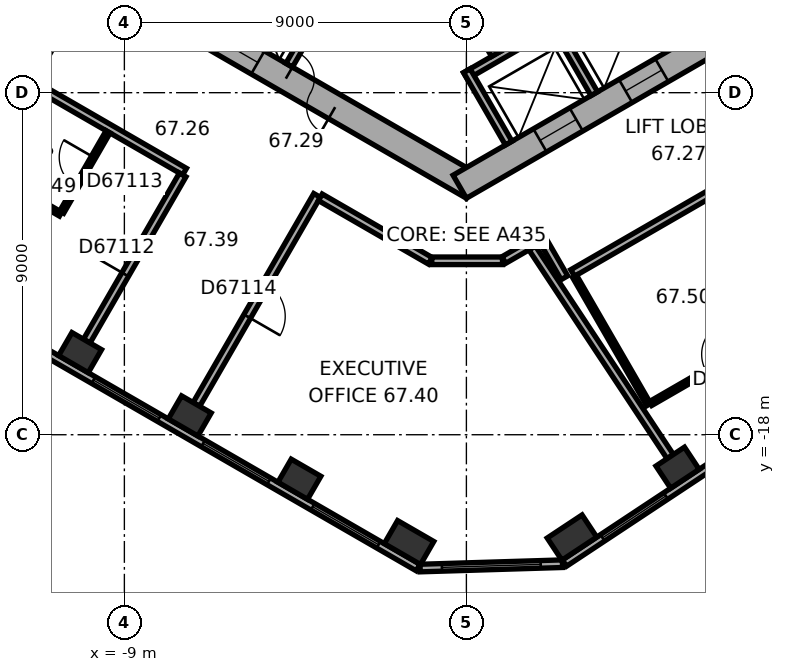
"""IFC4 building model, lengths in metres.
Left out: names, types, materials, properties, quantities, classifications, styles, units other than length and angle.
Written with IfcOpenShell. Run it as: python <this file> out.ifc"""

import sys

from ifc_helpers import new_model, si_unit, direction, frame, frame_2d, origin, origin_2d, place, context, subcontext, project, spatial, rectangle, extrude, element, fill, save


model = new_model("IFC4")
c1 = context("Model", 3, precision=1e-05, world=origin(), true_north=direction((0.0, 1.0)))
c2 = subcontext(c1, "Body", "Model", "MODEL_VIEW")
j1 = project(units=[si_unit("LENGTHUNIT", "METRE"), si_unit("PLANEANGLEUNIT", "RADIAN")], contexts=[c1])
p1 = place(None, origin())
s1 = spatial("IfcSite", under=j1, at=p1, CompositionType="ELEMENT")
p2 = place(p1, origin())
s2 = spatial("IfcBuilding", under=s1, at=p2, CompositionType="ELEMENT")
p3 = place(p2, frame((0.0, 0.0, 270.9)))
s3 = spatial("IfcBuildingStorey", under=s2, at=p3, CompositionType="ELEMENT", Elevation=270.9)
for number, where, z_axis, x_axis in (
    (1, (-10.165, -15.84, 0.0), (0.0, 0.0, 1.0), (0.866, -0.5, 0.0)),
    (2, (-7.28, -17.505, 0.0), (0.0, 0.0, 1.0), (0.866, -0.5, 0.0)),
    (3, (-4.395, -19.171, 0.0), (0.0, 0.0, 1.0), (0.866, -0.5, 0.0)),
):
    element("IfcColumn", number, at=place(p3, frame(where, z_axis=z_axis, x_axis=x_axis)), inside=s3, PredefinedType="COLUMN", context=c2, shape_type="SweptSolid", body=[
        extrude(rectangle(XDim=0.9, YDim=0.7, at=origin_2d()), origin(), (0.0, 0.0, 1.0), 3.7),
    ])
for number, where, z_axis, x_axis in (
    (4, (-1.509, -20.837, 0.0), (0.0, 0.0, 1.0), (0.866, -0.5, 0.0)),
    (5, (2.778, -20.706, 0.0), (0.0, 0.0, 1.0), (0.834, 0.552, 0.0)),
):
    element("IfcColumn", number, at=place(p3, frame(where, z_axis=z_axis, x_axis=x_axis)), inside=s3, PredefinedType="COLUMN", context=c2, shape_type="SweptSolid", body=[
        extrude(rectangle(XDim=1.1, YDim=0.7, at=origin_2d()), origin(), (0.0, 0.0, 1.0), 3.7),
    ])
p4 = place(p3, frame((5.557, -18.867, 0.0), z_axis=(0.0, 0.0, 1.0), x_axis=(0.833885822067, 0.551936985312, 0.0)))
e6 = element("IfcColumn", 6, at=p4, inside=s3, PredefinedType="COLUMN", context=c2, shape_type="SweptSolid", body=[
    extrude(rectangle(XDim=0.9, YDim=0.7, at=origin_2d()), origin(), (0.0, 0.0, 1.0), 3.7),
])
p5 = place(p3, frame((-10.025, -5.586, 0.0), z_axis=(0.0, 0.0, 1.0), x_axis=(0.866026453023, -0.499998182661, 0.0)))
e7 = element("IfcWall", 7, at=p5, inside=s3, PredefinedType="SHEAR", context=c2, shape_type="SweptSolid", body=[
    extrude(rectangle(XDim=11.778, YDim=0.7, at=frame_2d((5.889, 0.0))), origin(), (0.0, 0.0, 1.0), 3.7),
])
p6 = place(p5, frame((6.089, 0.0, 0.0)))
e8 = element("IfcOpeningElement", 8, at=p6, cuts=e7, PredefinedType="OPENING", context=c2, shape_type="SweptSolid", body=[
    extrude(rectangle(XDim=1.5, YDim=2.1, at=frame_2d((0.75, 1.05))), frame((0.0, 0.36, 0.0), z_axis=(0.0, -1.0, 0.0), x_axis=(1.0, 0.0, 0.0)), (0.0, 0.0, 1.0), 0.72),
])
p7 = place(p5, frame((1.539, 0.0, 0.0)))
e9 = element("IfcOpeningElement", 9, at=p7, cuts=e7, PredefinedType="OPENING", context=c2, shape_type="SweptSolid", body=[
    extrude(rectangle(XDim=1.1, YDim=2.1, at=frame_2d((0.55, 1.05))), frame((0.0, 0.36, 0.0), z_axis=(0.0, -1.0, 0.0), x_axis=(1.0, 0.0, 0.0)), (0.0, 0.0, 1.0), 0.72),
])
p8 = place(p5, frame((4.139, 0.0, 0.0)))
e10 = element("IfcOpeningElement", 10, at=p8, cuts=e7, PredefinedType="OPENING", context=c2, shape_type="SweptSolid", body=[
    extrude(rectangle(XDim=1.1, YDim=2.1, at=frame_2d((0.55, 1.05))), frame((0.0, 0.36, 0.0), z_axis=(0.0, -1.0, 0.0), x_axis=(1.0, 0.0, 0.0)), (0.0, 0.0, 1.0), 0.72),
])
p9 = place(p3, frame((-0.175, -11.475, 0.0), z_axis=(0.0, 0.0, 1.0), x_axis=(0.866026453023, 0.499998182661, 0.0)))
e11 = element("IfcWall", 11, at=p9, inside=s3, PredefinedType="SHEAR", context=c2, shape_type="SweptSolid", body=[
    extrude(rectangle(XDim=11.778, YDim=0.7, at=frame_2d((5.889, 0.0))), origin(), (0.0, 0.0, 1.0), 3.7),
])
p10 = place(p9, frame((2.439, 0.0, 0.0)))
e12 = element("IfcOpeningElement", 12, at=p10, cuts=e11, PredefinedType="OPENING", context=c2, shape_type="SweptSolid", body=[
    extrude(rectangle(XDim=1.1, YDim=2.1, at=frame_2d((0.55, 1.05))), frame((0.0, 0.36, 0.0), z_axis=(0.0, -1.0, 0.0), x_axis=(1.0, 0.0, 0.0)), (0.0, 0.0, 1.0), 0.72),
])
p11 = place(p9, frame((5.039, 0.0, 0.0)))
e13 = element("IfcOpeningElement", 13, at=p11, cuts=e11, PredefinedType="OPENING", context=c2, shape_type="SweptSolid", body=[
    extrude(rectangle(XDim=1.1, YDim=2.1, at=frame_2d((0.55, 1.05))), frame((0.0, 0.36, 0.0), z_axis=(0.0, -1.0, 0.0), x_axis=(1.0, 0.0, 0.0)), (0.0, 0.0, 1.0), 0.72),
])
p12 = place(p9, frame((7.639, 0.0, 0.0)))
e14 = element("IfcOpeningElement", 14, at=p12, cuts=e11, PredefinedType="OPENING", context=c2, shape_type="SweptSolid", body=[
    extrude(rectangle(XDim=1.1, YDim=2.1, at=frame_2d((0.55, 1.05))), frame((0.0, 0.36, 0.0), z_axis=(0.0, -1.0, 0.0), x_axis=(1.0, 0.0, 0.0)), (0.0, 0.0, 1.0), 0.72),
])
p13 = place(p3, frame((-16.626, -12.629, 0.0), z_axis=(0.0, 0.0, 1.0), x_axis=(0.866026460444, -0.499998169808, 0.0)))
e15 = element("IfcWall", 15, at=p13, inside=s3, PredefinedType="STANDARD", context=c2, shape_type="SweptSolid", body=[
    extrude(rectangle(XDim=17.731, YDim=0.2, at=frame_2d((8.866, 0.0))), origin(), (0.0, 0.0, 1.0), 3.7),
])
p14 = place(p13, frame((1.203, 0.0, 0.9)))
e16 = element("IfcOpeningElement", 16, at=p14, cuts=e15, PredefinedType="OPENING", context=c2, shape_type="SweptSolid", body=[
    extrude(rectangle(XDim=2.0, YDim=2.0, at=frame_2d((1.0, 1.0))), frame((0.0, 0.11, 0.0), z_axis=(0.0, -1.0, 0.0), x_axis=(1.0, 0.0, 0.0)), (0.0, 0.0, 1.0), 0.22),
])
p15 = place(p13, frame((4.535, 0.0, 0.9)))
e17 = element("IfcOpeningElement", 17, at=p15, cuts=e15, PredefinedType="OPENING", context=c2, shape_type="SweptSolid", body=[
    extrude(rectangle(XDim=2.0, YDim=2.0, at=frame_2d((1.0, 1.0))), frame((0.0, 0.11, 0.0), z_axis=(0.0, -1.0, 0.0), x_axis=(1.0, 0.0, 0.0)), (0.0, 0.0, 1.0), 0.22),
])
p16 = place(p13, frame((7.867, 0.0, 0.9)))
e18 = element("IfcOpeningElement", 18, at=p16, cuts=e15, PredefinedType="OPENING", context=c2, shape_type="SweptSolid", body=[
    extrude(rectangle(XDim=2.0, YDim=2.0, at=frame_2d((1.0, 1.0))), frame((0.0, 0.11, 0.0), z_axis=(0.0, -1.0, 0.0), x_axis=(1.0, 0.0, 0.0)), (0.0, 0.0, 1.0), 0.22),
])
p17 = place(p13, frame((11.198, 0.0, 0.9)))
e19 = element("IfcOpeningElement", 19, at=p17, cuts=e15, PredefinedType="OPENING", context=c2, shape_type="SweptSolid", body=[
    extrude(rectangle(XDim=2.0, YDim=2.0, at=frame_2d((1.0, 1.0))), frame((0.0, 0.11, 0.0), z_axis=(0.0, -1.0, 0.0), x_axis=(1.0, 0.0, 0.0)), (0.0, 0.0, 1.0), 0.22),
])
p18 = place(p13, frame((14.53, 0.0, 0.9)))
e20 = element("IfcOpeningElement", 20, at=p18, cuts=e15, PredefinedType="OPENING", context=c2, shape_type="SweptSolid", body=[
    extrude(rectangle(XDim=2.0, YDim=2.0, at=frame_2d((1.0, 1.0))), frame((0.0, 0.11, 0.0), z_axis=(0.0, -1.0, 0.0), x_axis=(1.0, 0.0, 0.0)), (0.0, 0.0, 1.0), 0.22),
])
p19 = place(p3, frame((-1.217, -21.508, 0.0), z_axis=(0.0, 0.0, 1.0), x_axis=(0.99953295295, 0.030559384285, 0.0)))
e21 = element("IfcWall", 21, at=p19, inside=s3, PredefinedType="STANDARD", context=c2, shape_type="SweptSolid", body=[
    extrude(rectangle(XDim=3.747, YDim=0.2, at=frame_2d((1.874, 0.0))), origin(), (0.0, 0.0, 1.0), 3.7),
])
p20 = place(p19, frame((0.573, 0.0, 0.9)))
e22 = element("IfcOpeningElement", 22, at=p20, cuts=e21, PredefinedType="OPENING", context=c2, shape_type="SweptSolid", body=[
    extrude(rectangle(XDim=2.6, YDim=2.0, at=frame_2d((1.3, 1.0))), frame((0.0, 0.11, 0.0), z_axis=(0.0, -1.0, 0.0), x_axis=(1.0, 0.0, 0.0)), (0.0, 0.0, 1.0), 0.22),
])
p21 = place(p3, frame((2.58, -21.377, 0.0), z_axis=(0.0, 0.0, 1.0), x_axis=(0.833888592176, 0.551932800112, 0.0)))
e23 = element("IfcWall", 23, at=p21, inside=s3, PredefinedType="STANDARD", context=c2, shape_type="SweptSolid", body=[
    extrude(rectangle(XDim=17.731, YDim=0.2, at=frame_2d((8.866, 0.0))), origin(), (0.0, 0.0, 1.0), 3.7),
])
p22 = place(p21, frame((1.202, 0.0, 0.9)))
e24 = element("IfcOpeningElement", 24, at=p22, cuts=e23, PredefinedType="OPENING", context=c2, shape_type="SweptSolid", body=[
    extrude(rectangle(XDim=2.0, YDim=2.0, at=frame_2d((1.0, 1.0))), frame((0.0, 0.11, 0.0), z_axis=(0.0, -1.0, 0.0), x_axis=(1.0, 0.0, 0.0)), (0.0, 0.0, 1.0), 0.22),
])
p23 = place(p21, frame((4.533, 0.0, 0.9)))
e25 = element("IfcOpeningElement", 25, at=p23, cuts=e23, PredefinedType="OPENING", context=c2, shape_type="SweptSolid", body=[
    extrude(rectangle(XDim=2.0, YDim=2.0, at=frame_2d((1.0, 1.0))), frame((0.0, 0.11, 0.0), z_axis=(0.0, -1.0, 0.0), x_axis=(1.0, 0.0, 0.0)), (0.0, 0.0, 1.0), 0.22),
])
p24 = place(p21, frame((7.865, 0.0, 0.9)))
e26 = element("IfcOpeningElement", 26, at=p24, cuts=e23, PredefinedType="OPENING", context=c2, shape_type="SweptSolid", body=[
    extrude(rectangle(XDim=2.0, YDim=2.0, at=frame_2d((1.0, 1.0))), frame((0.0, 0.11, 0.0), z_axis=(0.0, -1.0, 0.0), x_axis=(1.0, 0.0, 0.0)), (0.0, 0.0, 1.0), 0.22),
])
p25 = place(p21, frame((11.197, 0.0, 0.9)))
e27 = element("IfcOpeningElement", 27, at=p25, cuts=e23, PredefinedType="OPENING", context=c2, shape_type="SweptSolid", body=[
    extrude(rectangle(XDim=2.0, YDim=2.0, at=frame_2d((1.0, 1.0))), frame((0.0, 0.11, 0.0), z_axis=(0.0, -1.0, 0.0), x_axis=(1.0, 0.0, 0.0)), (0.0, 0.0, 1.0), 0.22),
])
p26 = place(p21, frame((14.528, 0.0, 0.9)))
e28 = element("IfcOpeningElement", 28, at=p26, cuts=e23, PredefinedType="OPENING", context=c2, shape_type="SweptSolid", body=[
    extrude(rectangle(XDim=2.0, YDim=2.0, at=frame_2d((1.0, 1.0))), frame((0.0, 0.11, 0.0), z_axis=(0.0, -1.0, 0.0), x_axis=(1.0, 0.0, 0.0)), (0.0, 0.0, 1.0), 0.22),
])
p27 = place(p3, frame((-3.563, -6.372, 0.0), z_axis=(0.0, 0.0, 1.0), x_axis=(-0.499994660107, -0.866028486751, 0.0)))
e29 = element("IfcWall", 29, at=p27, inside=s3, PredefinedType="PARTITIONING", context=c2, shape_type="SweptSolid", body=[
    extrude(rectangle(XDim=2.2, YDim=0.2, at=frame_2d((1.1, 0.0))), origin(), (0.0, 0.0, 1.0), 3.42),
])
p28 = place(p3, frame((-0.024, -8.559, 0.0), z_axis=(0.0, 0.0, 1.0), x_axis=(0.866026010844, 0.49999894854, 0.0)))
e30 = element("IfcWall", 30, at=p28, inside=s3, PredefinedType="PARTITIONING", context=c2, shape_type="SweptSolid", body=[
    extrude(rectangle(XDim=8.0, YDim=0.2, at=frame_2d((4.0, 0.0))), origin(), (0.0, 0.0, 1.0), 3.42),
])
for number, where, z_axis, x_axis in (
    (31, (0.013, -8.422, 0.0), (0.0, 0.0, 1.0), (0.5, -0.866, 0.0)),
    (32, (2.264, -7.122, 0.0), (0.0, 0.0, 1.0), (0.5, -0.866, 0.0)),
):
    element("IfcWall", number, at=place(p3, frame(where, z_axis=z_axis, x_axis=x_axis)), inside=s3, PredefinedType="PARTITIONING", context=c2, shape_type="SweptSolid", body=[
        extrude(rectangle(XDim=2.2, YDim=0.2, at=frame_2d((1.1, 0.0))), origin(), (0.0, 0.0, 1.0), 3.42),
    ])
p29 = place(p3, frame((-1.558, -3.902, 0.0), z_axis=(0.0, 0.0, 1.0), x_axis=(0.499977259774, -0.866038532462, 0.0)))
e33 = element("IfcWall", 33, at=p29, inside=s3, PredefinedType="SHEAR", context=c2, shape_type="SweptSolid", body=[
    extrude(rectangle(XDim=4.7, YDim=0.3, at=frame_2d((2.35, 0.0))), origin(), (0.0, 0.0, 1.0), 3.42),
])
p30 = place(p29, frame((0.8, 0.0, 0.0)))
e34 = element("IfcOpeningElement", 34, at=p30, cuts=e33, PredefinedType="OPENING", context=c2, shape_type="SweptSolid", body=[
    extrude(rectangle(XDim=1.2, YDim=2.1, at=frame_2d((0.6, 1.05))), frame((0.0, 0.16, 0.0), z_axis=(0.0, -1.0, 0.0), x_axis=(1.0, 0.0, 0.0)), (0.0, 0.0, 1.0), 0.32),
])
p31 = place(p3, frame((-11.285, -8.844, 0.0), z_axis=(0.0, 0.0, 1.0), x_axis=(0.866021785011, -0.500006267848, 0.0)))
e35 = element("IfcWall", 35, at=p31, inside=s3, PredefinedType="PARTITIONING", context=c2, shape_type="SweptSolid", body=[
    extrude(rectangle(XDim=4.468, YDim=0.2, at=frame_2d((2.234, 0.0))), origin(), (0.0, 0.0, 1.0), 3.42),
])
p32 = place(p3, frame((-10.901, -7.678, 0.0), z_axis=(0.0, 0.0, 1.0), x_axis=(-0.500074377092, -0.865982457891, 0.0)))
e36 = element("IfcWall", 36, at=p32, inside=s3, PredefinedType="PARTITIONING", context=c2, shape_type="SweptSolid", body=[
    extrude(rectangle(XDim=1.201, YDim=0.2, at=frame_2d((0.601, 0.0))), origin(), (0.0, 0.0, 1.0), 3.42),
])
p33 = place(p3, frame((-10.679, -12.195, 0.0), z_axis=(0.0, 0.0, 1.0), x_axis=(-0.866037418504, 0.499979189318, 0.0)))
e37 = element("IfcWall", 37, at=p33, inside=s3, PredefinedType="PARTITIONING", context=c2, shape_type="SweptSolid", body=[
    extrude(rectangle(XDim=2.14, YDim=0.12, at=frame_2d((1.07, 0.0))), origin(), (0.0, 0.0, 1.0), 3.42),
])
p34 = place(p3, frame((-9.99, -15.537, 0.0), z_axis=(0.0, 0.0, 1.0), x_axis=(0.499966611936, 0.866044679534, 0.0)))
e38 = element("IfcWall", 38, at=p34, inside=s3, PredefinedType="PARTITIONING", context=c2, shape_type="SweptSolid", body=[
    extrude(rectangle(XDim=5.049, YDim=0.2, at=frame_2d((2.524, 0.0))), origin(), (0.0, 0.0, 1.0), 2.87),
])
p35 = place(p34, frame((2.024, 0.0, 0.0)))
e39 = element("IfcOpeningElement", 39, at=p35, cuts=e38, PredefinedType="OPENING", context=c2, shape_type="SweptSolid", body=[
    extrude(rectangle(XDim=1.0, YDim=2.1, at=frame_2d((0.5, 1.05))), frame((0.0, 0.11, 0.0), z_axis=(0.0, -1.0, 0.0), x_axis=(1.0, 0.0, 0.0)), (0.0, 0.0, 1.0), 0.22),
])
p36 = place(p3, frame((-9.429, -10.03, 0.0), z_axis=(0.0, 0.0, 1.0), x_axis=(-0.500034220881, -0.866005645448, 0.0)))
e40 = element("IfcWall", 40, at=p36, inside=s3, PredefinedType="PARTITIONING", context=c2, shape_type="SweptSolid", body=[
    extrude(rectangle(XDim=2.44, YDim=0.12, at=frame_2d((1.22, 0.0))), origin(), (0.0, 0.0, 1.0), 3.42),
])
p37 = place(p36, frame((0.77, 0.0, 0.0)))
e41 = element("IfcOpeningElement", 41, at=p37, cuts=e40, PredefinedType="OPENING", context=c2, shape_type="SweptSolid", body=[
    extrude(rectangle(XDim=0.9, YDim=2.1, at=frame_2d((0.45, 1.05))), frame((0.0, 0.07, 0.0), z_axis=(0.0, -1.0, 0.0), x_axis=(1.0, 0.0, 0.0)), (0.0, 0.0, 1.0), 0.14),
])
p38 = place(p3, frame((-7.105, -17.202, 0.0), z_axis=(0.0, 0.0, 1.0), x_axis=(0.499988692146, 0.866031932279, 0.0)))
e42 = element("IfcWall", 42, at=p38, inside=s3, PredefinedType="PARTITIONING", context=c2, shape_type="SweptSolid", body=[
    extrude(rectangle(XDim=6.35, YDim=0.2, at=frame_2d((3.175, 0.0))), origin(), (0.0, 0.0, 1.0), 3.42),
])
p39 = place(p38, frame((2.675, 0.0, 0.0)))
e43 = element("IfcOpeningElement", 43, at=p39, cuts=e42, PredefinedType="OPENING", context=c2, shape_type="SweptSolid", body=[
    extrude(rectangle(XDim=1.0, YDim=2.1, at=frame_2d((0.5, 1.05))), frame((0.0, 0.11, 0.0), z_axis=(0.0, -1.0, 0.0), x_axis=(1.0, 0.0, 0.0)), (0.0, 0.0, 1.0), 0.22),
])
p40 = place(p3, frame((-3.843, -11.753, 0.0), z_axis=(0.0, 0.0, 1.0), x_axis=(0.866031037473, -0.499990242038, 0.0)))
e44 = element("IfcWall", 44, at=p40, inside=s3, PredefinedType="PARTITIONING", context=c2, shape_type="SweptSolid", body=[
    extrude(rectangle(XDim=3.341, YDim=0.2, at=frame_2d((1.67, 0.0))), origin(), (0.0, 0.0, 1.0), 3.42),
])
p41 = place(p3, frame((-0.91, -13.423, 0.0), z_axis=(0.0, 0.0, 1.0), x_axis=(1.0, 0.0, 0.0)))
e45 = element("IfcWall", 45, at=p41, inside=s3, PredefinedType="PARTITIONING", context=c2, shape_type="SweptSolid", body=[
    extrude(rectangle(XDim=1.86, YDim=0.2, at=frame_2d((0.93, 0.0))), origin(), (0.0, 0.0, 1.0), 3.42),
])
p42 = place(p3, frame((0.985, -13.403, 0.0), z_axis=(0.0, 0.0, 1.0), x_axis=(0.866032814021, 0.499987164874, 0.0)))
e46 = element("IfcWall", 46, at=p42, inside=s3, PredefinedType="PARTITIONING", context=c2, shape_type="SweptSolid", body=[
    extrude(rectangle(XDim=0.798, YDim=0.2, at=frame_2d((0.399, 0.0))), origin(), (0.0, 0.0, 1.0), 3.42),
])
p43 = place(p3, frame((1.979, -12.829, 0.0), z_axis=(0.0, 0.0, 1.0), x_axis=(0.500074377092, -0.865982457891, 0.0)))
e47 = element("IfcWall", 47, at=p43, inside=s3, PredefinedType="PARTITIONING", context=c2, shape_type="SweptSolid", body=[
    extrude(rectangle(XDim=1.201, YDim=0.2, at=frame_2d((0.601, 0.0))), origin(), (0.0, 0.0, 1.0), 3.42),
])
p44 = place(p3, frame((2.796, -13.744, 0.0), z_axis=(0.0, 0.0, 1.0), x_axis=(0.866018331238, 0.50001224981, 0.0)))
e48 = element("IfcWall", 48, at=p44, inside=s3, PredefinedType="PARTITIONING", context=c2, shape_type="SweptSolid", body=[
    extrude(rectangle(XDim=4.4, YDim=0.2, at=frame_2d((2.2, 0.0))), origin(), (0.0, 0.0, 1.0), 3.42),
])
p45 = place(p3, frame((4.796, -17.208, 0.0), z_axis=(0.0, 0.0, 1.0), x_axis=(-0.500043961785, 0.866000020948, 0.0)))
e49 = element("IfcWall", 49, at=p45, inside=s3, PredefinedType="PARTITIONING", context=c2, shape_type="SweptSolid", body=[
    extrude(rectangle(XDim=3.9, YDim=0.12, at=frame_2d((1.95, 0.0))), origin(), (0.0, 0.0, 1.0), 3.42),
])
p46 = place(p3, frame((5.364, -18.575, 0.0), z_axis=(0.0, 0.0, 1.0), x_axis=(-0.55195757761, 0.833872191957, 0.0)))
e50 = element("IfcWall", 50, at=p46, inside=s3, PredefinedType="PARTITIONING", context=c2, shape_type="SweptSolid", body=[
    extrude(rectangle(XDim=6.581, YDim=0.2, at=frame_2d((3.291, 0.0))), origin(), (0.0, 0.0, 1.0), 3.42),
])
p47 = place(p3, frame((8.554, -15.039, 0.0), z_axis=(0.0, 0.0, 1.0), x_axis=(-0.865994635417, -0.500053288589, 0.0)))
e51 = element("IfcWall", 51, at=p47, inside=s3, PredefinedType="PARTITIONING", context=c2, shape_type="SweptSolid", body=[
    extrude(rectangle(XDim=4.28, YDim=0.12, at=frame_2d((2.14, 0.0))), origin(), (0.0, 0.0, 1.0), 3.42),
])
p48 = place(p47, frame((1.69, 0.0, 0.0)))
e52 = element("IfcOpeningElement", 52, at=p48, cuts=e51, PredefinedType="OPENING", context=c2, shape_type="SweptSolid", body=[
    extrude(rectangle(XDim=0.9, YDim=2.1, at=frame_2d((0.45, 1.05))), frame((0.0, 0.07, 0.0), z_axis=(0.0, -1.0, 0.0), x_axis=(1.0, 0.0, 0.0)), (0.0, 0.0, 1.0), 0.14),
])
p49 = place(p16, origin())
e53 = element("IfcWindow", 53, at=p49, inside=s3, PartitioningType="SINGLE_PANEL", PredefinedType="WINDOW", context=c2, shape_type="SweptSolid", body=[
    extrude(rectangle(XDim=2.0, YDim=2.0, at=frame_2d((1.0, 1.0))), frame((0.0, 0.03, 0.0), z_axis=(0.0, -1.0, 0.0), x_axis=(1.0, 0.0, 0.0)), (0.0, 0.0, 1.0), 0.06),
])
fill(e18, e53)
p50 = place(p17, origin())
e54 = element("IfcWindow", 54, at=p50, inside=s3, PartitioningType="SINGLE_PANEL", PredefinedType="WINDOW", context=c2, shape_type="SweptSolid", body=[
    extrude(rectangle(XDim=2.0, YDim=2.0, at=frame_2d((1.0, 1.0))), frame((0.0, 0.03, 0.0), z_axis=(0.0, -1.0, 0.0), x_axis=(1.0, 0.0, 0.0)), (0.0, 0.0, 1.0), 0.06),
])
fill(e19, e54)
p51 = place(p18, origin())
e55 = element("IfcWindow", 55, at=p51, inside=s3, PartitioningType="SINGLE_PANEL", PredefinedType="WINDOW", context=c2, shape_type="SweptSolid", body=[
    extrude(rectangle(XDim=2.0, YDim=2.0, at=frame_2d((1.0, 1.0))), frame((0.0, 0.03, 0.0), z_axis=(0.0, -1.0, 0.0), x_axis=(1.0, 0.0, 0.0)), (0.0, 0.0, 1.0), 0.06),
])
fill(e20, e55)
p52 = place(p20, origin())
e56 = element("IfcWindow", 56, at=p52, inside=s3, PartitioningType="SINGLE_PANEL", PredefinedType="WINDOW", context=c2, shape_type="SweptSolid", body=[
    extrude(rectangle(XDim=2.6, YDim=2.0, at=frame_2d((1.3, 1.0))), frame((0.0, 0.03, 0.0), z_axis=(0.0, -1.0, 0.0), x_axis=(1.0, 0.0, 0.0)), (0.0, 0.0, 1.0), 0.06),
])
fill(e22, e56)
p53 = place(p22, origin())
e57 = element("IfcWindow", 57, at=p53, inside=s3, PartitioningType="SINGLE_PANEL", PredefinedType="WINDOW", context=c2, shape_type="SweptSolid", body=[
    extrude(rectangle(XDim=2.0, YDim=2.0, at=frame_2d((1.0, 1.0))), frame((0.0, 0.03, 0.0), z_axis=(0.0, -1.0, 0.0), x_axis=(1.0, 0.0, 0.0)), (0.0, 0.0, 1.0), 0.06),
])
fill(e24, e57)
p54 = place(p6, origin())
e58 = element("IfcDoor", 58, at=p54, inside=s3, OperationType="DOUBLE_DOOR_SINGLE_SWING", PredefinedType="DOOR", context=c2, shape_type="SweptSolid", body=[
    extrude(rectangle(XDim=1.5, YDim=2.1, at=frame_2d((0.75, 1.05))), frame((0.0, 0.025, 0.0), z_axis=(0.0, -1.0, 0.0), x_axis=(1.0, 0.0, 0.0)), (0.0, 0.0, 1.0), 0.05),
])
fill(e8, e58)
p55 = place(p8, origin())
e59 = element("IfcDoor", 59, at=p55, inside=s3, OperationType="DOUBLE_DOOR_SLIDING", PredefinedType="DOOR", context=c2, shape_type="SweptSolid", body=[
    extrude(rectangle(XDim=1.1, YDim=2.1, at=frame_2d((0.55, 1.05))), frame((0.0, 0.025, 0.0), z_axis=(0.0, -1.0, 0.0), x_axis=(1.0, 0.0, 0.0)), (0.0, 0.0, 1.0), 0.05),
])
fill(e10, e59)
p56 = place(p10, origin())
e60 = element("IfcDoor", 60, at=p56, inside=s3, OperationType="DOUBLE_DOOR_SLIDING", PredefinedType="DOOR", context=c2, shape_type="SweptSolid", body=[
    extrude(rectangle(XDim=1.1, YDim=2.1, at=frame_2d((0.55, 1.05))), frame((0.0, 0.025, 0.0), z_axis=(0.0, -1.0, 0.0), x_axis=(1.0, 0.0, 0.0)), (0.0, 0.0, 1.0), 0.05),
])
fill(e12, e60)
p57 = place(p11, origin())
e61 = element("IfcDoor", 61, at=p57, inside=s3, OperationType="DOUBLE_DOOR_SLIDING", PredefinedType="DOOR", context=c2, shape_type="SweptSolid", body=[
    extrude(rectangle(XDim=1.1, YDim=2.1, at=frame_2d((0.55, 1.05))), frame((0.0, 0.025, 0.0), z_axis=(0.0, -1.0, 0.0), x_axis=(1.0, 0.0, 0.0)), (0.0, 0.0, 1.0), 0.05),
])
fill(e13, e61)
p58 = place(p35, origin())
e62 = element("IfcDoor", 62, at=p58, inside=s3, OperationType="SINGLE_SWING_LEFT", PredefinedType="DOOR", context=c2, shape_type="SweptSolid", body=[
    extrude(rectangle(XDim=1.0, YDim=2.1, at=frame_2d((0.5, 1.05))), frame((0.0, 0.025, 0.0), z_axis=(0.0, -1.0, 0.0), x_axis=(1.0, 0.0, 0.0)), (0.0, 0.0, 1.0), 0.05),
])
fill(e39, e62)
p59 = place(p37, origin())
e63 = element("IfcDoor", 63, at=p59, inside=s3, OperationType="SINGLE_SWING_LEFT", PredefinedType="DOOR", context=c2, shape_type="SweptSolid", body=[
    extrude(rectangle(XDim=0.9, YDim=2.1, at=frame_2d((0.45, 1.05))), frame((0.0, 0.025, 0.0), z_axis=(0.0, -1.0, 0.0), x_axis=(1.0, 0.0, 0.0)), (0.0, 0.0, 1.0), 0.05),
])
fill(e41, e63)
p60 = place(p39, origin())
e64 = element("IfcDoor", 64, at=p60, inside=s3, OperationType="SINGLE_SWING_LEFT", PredefinedType="DOOR", context=c2, shape_type="SweptSolid", body=[
    extrude(rectangle(XDim=1.0, YDim=2.1, at=frame_2d((0.5, 1.05))), frame((0.0, 0.025, 0.0), z_axis=(0.0, -1.0, 0.0), x_axis=(1.0, 0.0, 0.0)), (0.0, 0.0, 1.0), 0.05),
])
fill(e43, e64)
save(model, sys.argv[1])
